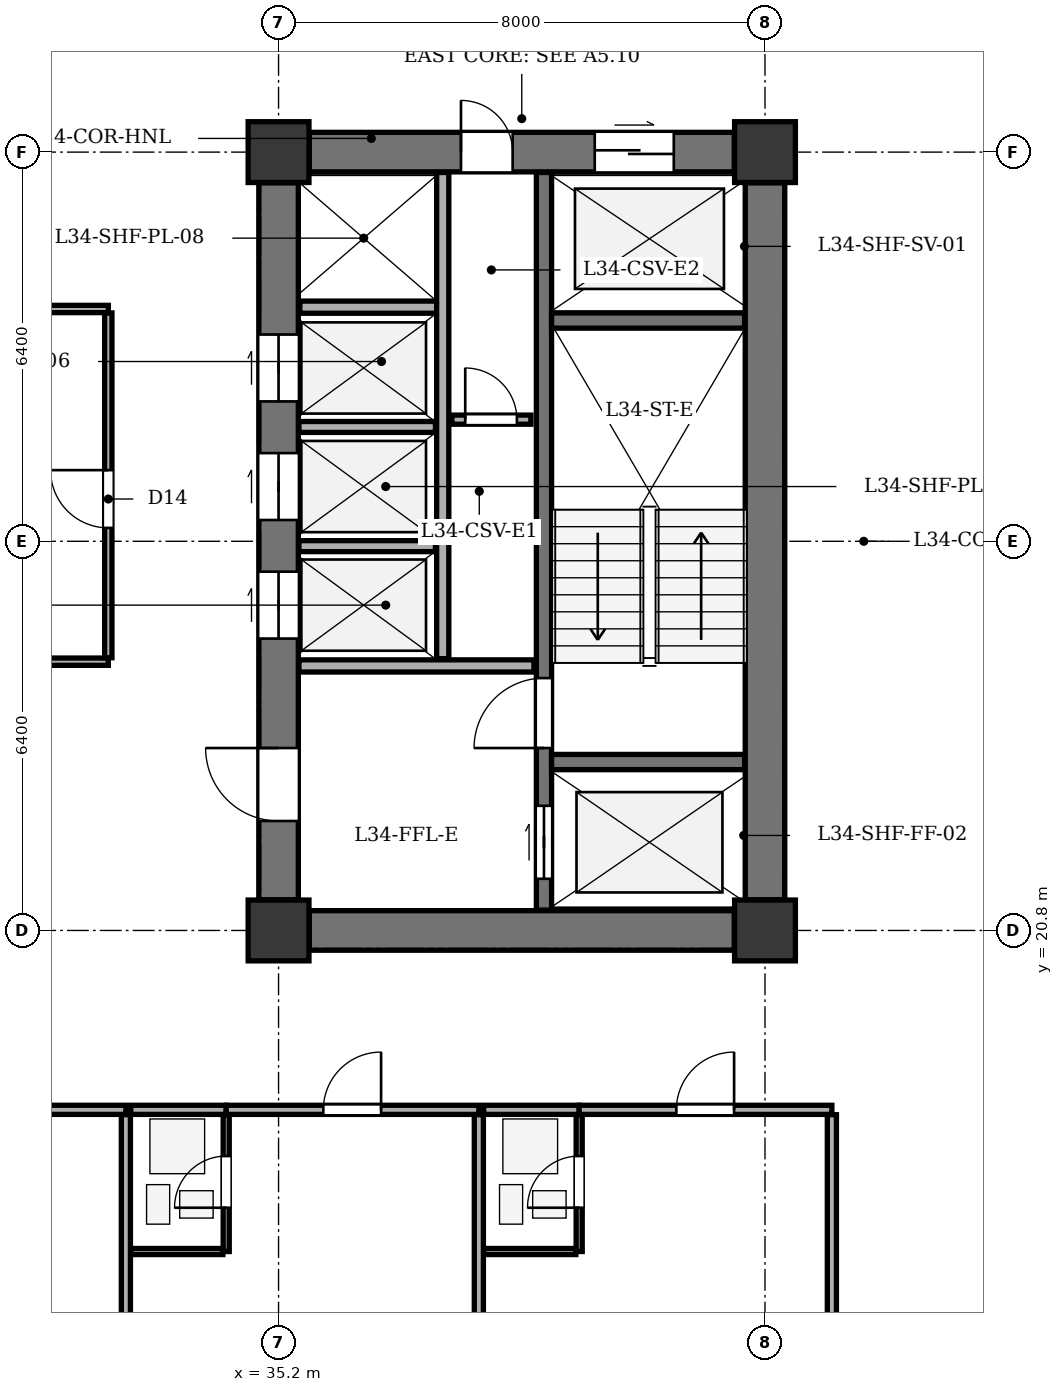
"""IFC4 building model, lengths in metres.
Left out: names, types, materials, properties, quantities, classifications, styles, units other than length and angle.
Written with IfcOpenShell. Run it as: python <this file> out.ifc"""

import sys

from ifc_helpers import new_model, si_unit, direction, frame, frame_2d, origin, origin_2d, place, context, subcontext, project, spatial, rectangle, extrude, element, fill, save


model = new_model("IFC4")
c1 = context("Model", 3, precision=1e-05, world=origin(), true_north=direction((0.0, 1.0)))
c2 = subcontext(c1, "Body", "Model", "MODEL_VIEW")
j1 = project(units=[si_unit("LENGTHUNIT", "METRE"), si_unit("PLANEANGLEUNIT", "RADIAN")], contexts=[c1])
p1 = place(None, origin())
s1 = spatial("IfcSite", under=j1, at=p1, CompositionType="ELEMENT")
p2 = place(p1, origin())
s2 = spatial("IfcBuilding", under=s1, at=p2, CompositionType="ELEMENT")
p3 = place(p2, frame((0.0, 0.0, 137.8)))
s3 = spatial("IfcBuildingStorey", under=s2, at=p3, CompositionType="ELEMENT", Elevation=137.8)
for number, where, z_axis, x_axis in (
    (1, (35.2, 20.8, 0.0), (0.0, 0.0, 1.0), (1.0, 0.0, 0.0)),
    (2, (43.2, 20.8, 0.0), (0.0, 0.0, 1.0), (1.0, 0.0, 0.0)),
    (3, (35.2, 33.6, 0.0), (0.0, 0.0, 1.0), (1.0, 0.0, 0.0)),
    (4, (43.2, 33.6, 0.0), (0.0, 0.0, 1.0), (1.0, 0.0, 0.0)),
):
    element("IfcColumn", number, at=place(p3, frame(where, z_axis=z_axis, x_axis=x_axis)), inside=s3, PredefinedType="COLUMN", context=c2, shape_type="SweptSolid", body=[
        extrude(rectangle(XDim=1.0, YDim=1.0, at=origin_2d()), origin(), (0.0, 0.0, 1.0), 3.5),
    ])
p4 = place(p3, frame((43.2, 21.305, 0.0), z_axis=(0.0, 0.0, 1.0), x_axis=(0.0, 1.0, 0.0)))
e5 = element("IfcWall", 5, at=p4, inside=s3, PredefinedType="SHEAR", context=c2, shape_type="SweptSolid", body=[
    extrude(rectangle(XDim=11.79, YDim=0.65, at=frame_2d((5.895, 0.0))), origin(), (0.0, 0.0, 1.0), 3.05),
])
p5 = place(p3, frame((35.705, 20.8, 0.0), z_axis=(0.0, 0.0, 1.0), x_axis=(1.0, 0.0, 0.0)))
e6 = element("IfcWall", 6, at=p5, inside=s3, PredefinedType="SHEAR", context=c2, shape_type="SweptSolid", body=[
    extrude(rectangle(XDim=6.99, YDim=0.65, at=frame_2d((3.495, 0.0))), origin(), (0.0, 0.0, 1.0), 3.05),
])
p6 = place(p3, frame((35.705, 33.6, 0.0), z_axis=(0.0, 0.0, 1.0), x_axis=(1.0, 0.0, 0.0)))
e7 = element("IfcWall", 7, at=p6, inside=s3, PredefinedType="SHEAR", context=c2, shape_type="SweptSolid", body=[
    extrude(rectangle(XDim=6.99, YDim=0.65, at=frame_2d((3.495, 0.0))), origin(), (0.0, 0.0, 1.0), 3.05),
])
p7 = place(p6, frame((4.695, 0.0, 0.0)))
e8 = element("IfcOpeningElement", 8, at=p7, cuts=e7, PredefinedType="OPENING", context=c2, shape_type="SweptSolid", body=[
    extrude(rectangle(XDim=1.3, YDim=2.15, at=frame_2d((0.65, 1.075))), frame((0.0, 0.335, 0.0), z_axis=(0.0, -1.0, 0.0), x_axis=(1.0, 0.0, 0.0)), (0.0, 0.0, 1.0), 0.67),
])
p8 = place(p6, frame((2.495, 0.0, 0.0)))
e9 = element("IfcOpeningElement", 9, at=p8, cuts=e7, PredefinedType="OPENING", context=c2, shape_type="SweptSolid", body=[
    extrude(rectangle(XDim=0.85, YDim=2.02, at=frame_2d((0.425, 1.01))), frame((0.0, 0.335, 0.0), z_axis=(0.0, -1.0, 0.0), x_axis=(1.0, 0.0, 0.0)), (0.0, 0.0, 1.0), 0.67),
])
p9 = place(p3, frame((35.2, 21.305, 0.0), z_axis=(0.0, 0.0, 1.0), x_axis=(0.0, 1.0, 0.0)))
e10 = element("IfcWall", 10, at=p9, inside=s3, PredefinedType="SHEAR", context=c2, shape_type="SweptSolid", body=[
    extrude(rectangle(XDim=11.79, YDim=0.65, at=frame_2d((5.895, 0.0))), origin(), (0.0, 0.0, 1.0), 3.05),
])
p10 = place(p9, frame((1.295, 0.0, 0.0)))
e11 = element("IfcOpeningElement", 11, at=p10, cuts=e10, PredefinedType="OPENING", context=c2, shape_type="SweptSolid", body=[
    extrude(rectangle(XDim=1.2, YDim=2.15, at=frame_2d((0.6, 1.075))), frame((0.0, 0.335, 0.0), z_axis=(0.0, -1.0, 0.0), x_axis=(1.0, 0.0, 0.0)), (0.0, 0.0, 1.0), 0.67),
])
p11 = place(p9, frame((4.295, 0.0, 0.0)))
e12 = element("IfcOpeningElement", 12, at=p11, cuts=e10, PredefinedType="OPENING", context=c2, shape_type="SweptSolid", body=[
    extrude(rectangle(XDim=1.1, YDim=2.1, at=frame_2d((0.55, 1.05))), frame((0.0, 0.335, 0.0), z_axis=(0.0, -1.0, 0.0), x_axis=(1.0, 0.0, 0.0)), (0.0, 0.0, 1.0), 0.67),
])
p12 = place(p9, frame((6.245, 0.0, 0.0)))
e13 = element("IfcOpeningElement", 13, at=p12, cuts=e10, PredefinedType="OPENING", context=c2, shape_type="SweptSolid", body=[
    extrude(rectangle(XDim=1.1, YDim=2.1, at=frame_2d((0.55, 1.05))), frame((0.0, 0.335, 0.0), z_axis=(0.0, -1.0, 0.0), x_axis=(1.0, 0.0, 0.0)), (0.0, 0.0, 1.0), 0.67),
])
p13 = place(p9, frame((8.195, 0.0, 0.0)))
e14 = element("IfcOpeningElement", 14, at=p13, cuts=e10, PredefinedType="OPENING", context=c2, shape_type="SweptSolid", body=[
    extrude(rectangle(XDim=1.1, YDim=2.1, at=frame_2d((0.55, 1.05))), frame((0.0, 0.335, 0.0), z_axis=(0.0, -1.0, 0.0), x_axis=(1.0, 0.0, 0.0)), (0.0, 0.0, 1.0), 0.67),
])
p14 = place(p3, frame((39.565, 21.135, 0.0), z_axis=(0.0, 0.0, 1.0), x_axis=(0.0, 1.0, 0.0)))
e15 = element("IfcWall", 15, at=p14, inside=s3, PredefinedType="SHEAR", context=c2, shape_type="SweptSolid", body=[
    extrude(rectangle(XDim=12.13, YDim=0.25, at=frame_2d((6.065, 0.0))), origin(), (0.0, 0.0, 1.0), 3.05),
])
p15 = place(p14, frame((0.515, 0.0, 0.0)))
e16 = element("IfcOpeningElement", 16, at=p15, cuts=e15, PredefinedType="OPENING", context=c2, shape_type="SweptSolid", body=[
    extrude(rectangle(XDim=1.2, YDim=2.15, at=frame_2d((0.6, 1.075))), frame((0.0, 0.135, 0.0), z_axis=(0.0, -1.0, 0.0), x_axis=(1.0, 0.0, 0.0)), (0.0, 0.0, 1.0), 0.27),
])
p16 = place(p14, frame((2.665, 0.0, 0.0)))
e17 = element("IfcOpeningElement", 17, at=p16, cuts=e15, PredefinedType="OPENING", context=c2, shape_type="SweptSolid", body=[
    extrude(rectangle(XDim=1.15, YDim=2.15, at=frame_2d((0.575, 1.075))), frame((0.0, 0.135, 0.0), z_axis=(0.0, -1.0, 0.0), x_axis=(1.0, 0.0, 0.0)), (0.0, 0.0, 1.0), 0.27),
])
for number, where, z_axis, x_axis in (
    (18, (39.69, 23.57, 0.0), (0.0, 0.0, 1.0), (1.0, 0.0, 0.0)),
    (19, (39.69, 30.83, 0.0), (0.0, 0.0, 1.0), (1.0, 0.0, 0.0)),
):
    element("IfcWall", number, at=place(p3, frame(where, z_axis=z_axis, x_axis=x_axis)), inside=s3, PredefinedType="SHEAR", context=c2, shape_type="SweptSolid", body=[
        extrude(rectangle(XDim=3.175, YDim=0.25, at=frame_2d((1.587, 0.0))), origin(), (0.0, 0.0, 1.0), 3.05),
    ])
p17 = place(p3, frame((35.535, 25.15, 0.0), z_axis=(0.0, 0.0, 1.0), x_axis=(1.0, 0.0, 0.0)))
e20 = element("IfcWall", 20, at=p17, inside=s3, PredefinedType="SOLIDWALL", context=c2, shape_type="SweptSolid", body=[
    extrude(rectangle(XDim=3.865, YDim=0.2, at=frame_2d((1.933, 0.0))), origin(), (0.0, 0.0, 1.0), 3.05),
])
p18 = place(p3, frame((35.55, 31.05, 0.0), z_axis=(0.0, 0.0, 1.0), x_axis=(1.0, 0.0, 0.0)))
e21 = element("IfcWall", 21, at=p18, inside=s3, PredefinedType="SOLIDWALL", context=c2, shape_type="SweptSolid", body=[
    extrude(rectangle(XDim=2.25, YDim=0.2, at=frame_2d((1.125, 0.0))), origin(), (0.0, 0.0, 1.0), 3.05),
])
p19 = place(p3, frame((37.9, 25.27, 0.0), z_axis=(0.0, 0.0, 1.0), x_axis=(0.0, 1.0, 0.0)))
e22 = element("IfcWall", 22, at=p19, inside=s3, PredefinedType="SOLIDWALL", context=c2, shape_type="SweptSolid", body=[
    extrude(rectangle(XDim=7.995, YDim=0.2, at=frame_2d((3.998, 0.0))), origin(), (0.0, 0.0, 1.0), 3.05),
])
for number, where, z_axis, x_axis in (
    (23, (35.535, 27.12, 0.0), (0.0, 0.0, 1.0), (1.0, 0.0, 0.0)),
    (24, (35.535, 29.08, 0.0), (0.0, 0.0, 1.0), (1.0, 0.0, 0.0)),
):
    element("IfcWall", number, at=place(p3, frame(where, z_axis=z_axis, x_axis=x_axis)), inside=s3, PredefinedType="PARTITIONING", context=c2, shape_type="SweptSolid", body=[
        extrude(rectangle(XDim=2.245, YDim=0.18, at=frame_2d((1.123, 0.0))), origin(), (0.0, 0.0, 1.0), 3.05),
    ])
p20 = place(p3, frame((38.05, 29.2, 0.0), z_axis=(0.0, 0.0, 1.0), x_axis=(1.0, 0.0, 0.0)))
e25 = element("IfcWall", 25, at=p20, inside=s3, PredefinedType="PARTITIONING", context=c2, shape_type="SweptSolid", body=[
    extrude(rectangle(XDim=1.3, YDim=0.15, at=frame_2d((0.65, 0.0))), origin(), (0.0, 0.0, 1.0), 3.05),
])
p21 = place(p20, frame((0.22, 0.0, 0.0)))
e26 = element("IfcOpeningElement", 26, at=p21, cuts=e25, PredefinedType="OPENING", context=c2, shape_type="SweptSolid", body=[
    extrude(rectangle(XDim=0.85, YDim=2.02, at=frame_2d((0.425, 1.01))), frame((0.0, 0.085, 0.0), z_axis=(0.0, -1.0, 0.0), x_axis=(1.0, 0.0, 0.0)), (0.0, 0.0, 1.0), 0.17),
])
p22 = place(p3, frame((20.46, 25.22, 0.0), z_axis=(0.0, 0.0, 1.0), x_axis=(1.0, 0.0, 0.0)))
e27 = element("IfcWall", 27, at=p22, inside=s3, PredefinedType="PARTITIONING", context=c2, shape_type="SweptSolid", body=[
    extrude(rectangle(XDim=11.94, YDim=0.12, at=frame_2d((5.97, 0.0))), origin(), (0.0, 0.0, 1.0), 3.05),
])
p23 = place(p22, frame((2.39, 0.0, 0.0)))
e28 = element("IfcOpeningElement", 28, at=p23, cuts=e27, PredefinedType="OPENING", context=c2, shape_type="SweptSolid", body=[
    extrude(rectangle(XDim=1.0, YDim=2.1, at=frame_2d((0.5, 1.05))), frame((0.0, 0.07, 0.0), z_axis=(0.0, -1.0, 0.0), x_axis=(1.0, 0.0, 0.0)), (0.0, 0.0, 1.0), 0.14),
])
p24 = place(p3, frame((20.46, 31.02, 0.0), z_axis=(0.0, 0.0, 1.0), x_axis=(1.0, 0.0, 0.0)))
e29 = element("IfcWall", 29, at=p24, inside=s3, PredefinedType="PARTITIONING", context=c2, shape_type="SweptSolid", body=[
    extrude(rectangle(XDim=11.94, YDim=0.12, at=frame_2d((5.97, 0.0))), origin(), (0.0, 0.0, 1.0), 3.05),
])
p25 = place(p3, frame((32.4, 25.285, 0.0), z_axis=(0.0, 0.0, 1.0), x_axis=(0.0, 1.0, 0.0)))
e30 = element("IfcWall", 30, at=p25, inside=s3, PredefinedType="PARTITIONING", context=c2, shape_type="SweptSolid", body=[
    extrude(rectangle(XDim=5.67, YDim=0.12, at=frame_2d((2.835, 0.0))), origin(), (0.0, 0.0, 1.0), 3.05),
])
p26 = place(p25, frame((2.135, 0.0, 0.0)))
e31 = element("IfcOpeningElement", 31, at=p26, cuts=e30, PredefinedType="OPENING", context=c2, shape_type="SweptSolid", body=[
    extrude(rectangle(XDim=0.95, YDim=2.1, at=frame_2d((0.475, 1.05))), frame((0.0, 0.07, 0.0), z_axis=(0.0, -1.0, 0.0), x_axis=(1.0, 0.0, 0.0)), (0.0, 0.0, 1.0), 0.14),
])
p27 = place(p3, frame((28.533, 17.85, 0.0), z_axis=(0.0, 0.0, 1.0), x_axis=(1.0, 0.0, 0.0)))
e32 = element("IfcWall", 32, at=p27, inside=s3, PredefinedType="PARTITIONING", context=c2, shape_type="SweptSolid", body=[
    extrude(rectangle(XDim=4.156, YDim=0.15, at=frame_2d((2.078, 0.0))), origin(), (0.0, 0.0, 1.0), 3.05),
])
p28 = place(p27, frame((1.598, 0.0, 0.0)))
e33 = element("IfcOpeningElement", 33, at=p28, cuts=e32, PredefinedType="OPENING", context=c2, shape_type="SweptSolid", body=[
    extrude(rectangle(XDim=0.95, YDim=2.1, at=frame_2d((0.475, 1.05))), frame((0.0, 0.085, 0.0), z_axis=(0.0, -1.0, 0.0), x_axis=(1.0, 0.0, 0.0)), (0.0, 0.0, 1.0), 0.17),
])
p29 = place(p3, frame((32.689, 1.875, 0.0), z_axis=(0.0, 0.0, 1.0), x_axis=(0.0, 1.0, 0.0)))
e34 = element("IfcWall", 34, at=p29, inside=s3, PredefinedType="PARTITIONING", context=c2, shape_type="SweptSolid", body=[
    extrude(rectangle(XDim=15.895, YDim=0.15, at=frame_2d((7.948, 0.0))), origin(), (0.0, 0.0, 1.0), 3.05),
])
p30 = place(p3, frame((32.769, 17.85, 0.0), z_axis=(0.0, 0.0, 1.0), x_axis=(1.0, 0.0, 0.0)))
e35 = element("IfcWall", 35, at=p30, inside=s3, PredefinedType="PARTITIONING", context=c2, shape_type="SweptSolid", body=[
    extrude(rectangle(XDim=1.57, YDim=0.15, at=frame_2d((0.785, 0.0))), origin(), (0.0, 0.0, 1.0), 3.05),
])
p31 = place(p3, frame((34.339, 17.85, 0.0), z_axis=(0.0, 0.0, 1.0), x_axis=(1.0, 0.0, 0.0)))
e36 = element("IfcWall", 36, at=p31, inside=s3, PredefinedType="PARTITIONING", context=c2, shape_type="SweptSolid", body=[
    extrude(rectangle(XDim=4.155, YDim=0.15, at=frame_2d((2.077, 0.0))), origin(), (0.0, 0.0, 1.0), 3.05),
])
p32 = place(p31, frame((1.597, 0.0, 0.0)))
e37 = element("IfcOpeningElement", 37, at=p32, cuts=e36, PredefinedType="OPENING", context=c2, shape_type="SweptSolid", body=[
    extrude(rectangle(XDim=0.95, YDim=2.1, at=frame_2d((0.475, 1.05))), frame((0.0, 0.085, 0.0), z_axis=(0.0, -1.0, 0.0), x_axis=(1.0, 0.0, 0.0)), (0.0, 0.0, 1.0), 0.17),
])
p33 = place(p3, frame((34.339, 15.52, 0.0), z_axis=(0.0, 0.0, 1.0), x_axis=(0.0, 1.0, 0.0)))
e38 = element("IfcWall", 38, at=p33, inside=s3, PredefinedType="PARTITIONING", context=c2, shape_type="SweptSolid", body=[
    extrude(rectangle(XDim=2.25, YDim=0.1, at=frame_2d((1.125, 0.0))), origin(), (0.0, 0.0, 1.0), 3.05),
])
p34 = place(p33, frame((0.72, 0.0, 0.0)))
e39 = element("IfcOpeningElement", 39, at=p34, cuts=e38, PredefinedType="OPENING", context=c2, shape_type="SweptSolid", body=[
    extrude(rectangle(XDim=0.85, YDim=2.05, at=frame_2d((0.425, 1.025))), frame((0.0, 0.06, 0.0), z_axis=(0.0, -1.0, 0.0), x_axis=(1.0, 0.0, 0.0)), (0.0, 0.0, 1.0), 0.12),
])
p35 = place(p3, frame((32.769, 15.52, 0.0), z_axis=(0.0, 0.0, 1.0), x_axis=(1.0, 0.0, 0.0)))
e40 = element("IfcWall", 40, at=p35, inside=s3, PredefinedType="PARTITIONING", context=c2, shape_type="SweptSolid", body=[
    extrude(rectangle(XDim=1.515, YDim=0.1, at=frame_2d((0.757, 0.0))), origin(), (0.0, 0.0, 1.0), 3.05),
])
p36 = place(p3, frame((38.494, 1.875, 0.0), z_axis=(0.0, 0.0, 1.0), x_axis=(0.0, 1.0, 0.0)))
e41 = element("IfcWall", 41, at=p36, inside=s3, PredefinedType="PARTITIONING", context=c2, shape_type="SweptSolid", body=[
    extrude(rectangle(XDim=15.895, YDim=0.15, at=frame_2d((7.948, 0.0))), origin(), (0.0, 0.0, 1.0), 2.485),
])
p37 = place(p3, frame((38.574, 17.85, 0.0), z_axis=(0.0, 0.0, 1.0), x_axis=(1.0, 0.0, 0.0)))
e42 = element("IfcWall", 42, at=p37, inside=s3, PredefinedType="PARTITIONING", context=c2, shape_type="SweptSolid", body=[
    extrude(rectangle(XDim=1.57, YDim=0.15, at=frame_2d((0.785, 0.0))), origin(), (0.0, 0.0, 1.0), 3.05),
])
p38 = place(p3, frame((40.144, 17.85, 0.0), z_axis=(0.0, 0.0, 1.0), x_axis=(1.0, 0.0, 0.0)))
e43 = element("IfcWall", 43, at=p38, inside=s3, PredefinedType="PARTITIONING", context=c2, shape_type="SweptSolid", body=[
    extrude(rectangle(XDim=4.156, YDim=0.15, at=frame_2d((2.078, 0.0))), origin(), (0.0, 0.0, 1.0), 3.05),
])
p39 = place(p38, frame((1.598, 0.0, 0.0)))
e44 = element("IfcOpeningElement", 44, at=p39, cuts=e43, PredefinedType="OPENING", context=c2, shape_type="SweptSolid", body=[
    extrude(rectangle(XDim=0.95, YDim=2.1, at=frame_2d((0.475, 1.05))), frame((0.0, 0.085, 0.0), z_axis=(0.0, -1.0, 0.0), x_axis=(1.0, 0.0, 0.0)), (0.0, 0.0, 1.0), 0.17),
])
p40 = place(p3, frame((40.144, 15.52, 0.0), z_axis=(0.0, 0.0, 1.0), x_axis=(0.0, 1.0, 0.0)))
e45 = element("IfcWall", 45, at=p40, inside=s3, PredefinedType="PARTITIONING", context=c2, shape_type="SweptSolid", body=[
    extrude(rectangle(XDim=2.25, YDim=0.1, at=frame_2d((1.125, 0.0))), origin(), (0.0, 0.0, 1.0), 3.05),
])
p41 = place(p40, frame((0.72, 0.0, 0.0)))
e46 = element("IfcOpeningElement", 46, at=p41, cuts=e45, PredefinedType="OPENING", context=c2, shape_type="SweptSolid", body=[
    extrude(rectangle(XDim=0.85, YDim=2.05, at=frame_2d((0.425, 1.025))), frame((0.0, 0.06, 0.0), z_axis=(0.0, -1.0, 0.0), x_axis=(1.0, 0.0, 0.0)), (0.0, 0.0, 1.0), 0.12),
])
p42 = place(p3, frame((38.574, 15.52, 0.0), z_axis=(0.0, 0.0, 1.0), x_axis=(1.0, 0.0, 0.0)))
e47 = element("IfcWall", 47, at=p42, inside=s3, PredefinedType="PARTITIONING", context=c2, shape_type="SweptSolid", body=[
    extrude(rectangle(XDim=1.515, YDim=0.1, at=frame_2d((0.758, 0.0))), origin(), (0.0, 0.0, 1.0), 3.05),
])
p43 = place(p3, frame((44.3, 1.875, 0.0), z_axis=(0.0, 0.0, 1.0), x_axis=(0.0, 1.0, 0.0)))
e48 = element("IfcWall", 48, at=p43, inside=s3, PredefinedType="PARTITIONING", context=c2, shape_type="SweptSolid", body=[
    extrude(rectangle(XDim=15.895, YDim=0.15, at=frame_2d((7.948, 0.0))), origin(), (0.0, 0.0, 1.0), 3.05),
])
p44 = place(p7, origin())
e49 = element("IfcDoor", 49, at=p44, inside=s3, OperationType="DOUBLE_DOOR_SLIDING", PredefinedType="DOOR", context=c2, shape_type="SweptSolid", body=[
    extrude(rectangle(XDim=1.3, YDim=2.15, at=frame_2d((0.65, 1.075))), frame((0.0, 0.025, 0.0), z_axis=(0.0, -1.0, 0.0), x_axis=(1.0, 0.0, 0.0)), (0.0, 0.0, 1.0), 0.05),
])
fill(e8, e49)
p45 = place(p8, origin())
e50 = element("IfcDoor", 50, at=p45, inside=s3, OperationType="SINGLE_SWING_LEFT", PredefinedType="DOOR", context=c2, shape_type="SweptSolid", body=[
    extrude(rectangle(XDim=0.85, YDim=2.02, at=frame_2d((0.425, 1.01))), frame((0.0, 0.025, 0.0), z_axis=(0.0, -1.0, 0.0), x_axis=(1.0, 0.0, 0.0)), (0.0, 0.0, 1.0), 0.05),
])
fill(e9, e50)
p46 = place(p10, origin())
e51 = element("IfcDoor", 51, at=p46, inside=s3, OperationType="SINGLE_SWING_RIGHT", PredefinedType="DOOR", context=c2, shape_type="SweptSolid", body=[
    extrude(rectangle(XDim=1.2, YDim=2.15, at=frame_2d((0.6, 1.075))), frame((0.0, 0.025, 0.0), z_axis=(0.0, -1.0, 0.0), x_axis=(1.0, 0.0, 0.0)), (0.0, 0.0, 1.0), 0.05),
])
fill(e11, e51)
p47 = place(p11, origin())
e52 = element("IfcDoor", 52, at=p47, inside=s3, OperationType="DOUBLE_DOOR_SLIDING", PredefinedType="DOOR", context=c2, shape_type="SweptSolid", body=[
    extrude(rectangle(XDim=1.1, YDim=2.1, at=frame_2d((0.55, 1.05))), frame((0.0, 0.025, 0.0), z_axis=(0.0, -1.0, 0.0), x_axis=(1.0, 0.0, 0.0)), (0.0, 0.0, 1.0), 0.05),
])
fill(e12, e52)
p48 = place(p12, origin())
e53 = element("IfcDoor", 53, at=p48, inside=s3, OperationType="DOUBLE_DOOR_SLIDING", PredefinedType="DOOR", context=c2, shape_type="SweptSolid", body=[
    extrude(rectangle(XDim=1.1, YDim=2.1, at=frame_2d((0.55, 1.05))), frame((0.0, 0.025, 0.0), z_axis=(0.0, -1.0, 0.0), x_axis=(1.0, 0.0, 0.0)), (0.0, 0.0, 1.0), 0.05),
])
fill(e13, e53)
p49 = place(p13, origin())
e54 = element("IfcDoor", 54, at=p49, inside=s3, OperationType="DOUBLE_DOOR_SLIDING", PredefinedType="DOOR", context=c2, shape_type="SweptSolid", body=[
    extrude(rectangle(XDim=1.1, YDim=2.1, at=frame_2d((0.55, 1.05))), frame((0.0, 0.025, 0.0), z_axis=(0.0, -1.0, 0.0), x_axis=(1.0, 0.0, 0.0)), (0.0, 0.0, 1.0), 0.05),
])
fill(e14, e54)
p50 = place(p15, origin())
e55 = element("IfcDoor", 55, at=p50, inside=s3, OperationType="DOUBLE_DOOR_SLIDING", PredefinedType="DOOR", context=c2, shape_type="SweptSolid", body=[
    extrude(rectangle(XDim=1.2, YDim=2.15, at=frame_2d((0.6, 1.075))), frame((0.0, 0.025, 0.0), z_axis=(0.0, -1.0, 0.0), x_axis=(1.0, 0.0, 0.0)), (0.0, 0.0, 1.0), 0.05),
])
fill(e16, e55)
p51 = place(p16, origin())
e56 = element("IfcDoor", 56, at=p51, inside=s3, OperationType="SINGLE_SWING_LEFT", PredefinedType="DOOR", context=c2, shape_type="SweptSolid", body=[
    extrude(rectangle(XDim=1.15, YDim=2.15, at=frame_2d((0.575, 1.075))), frame((0.0, 0.025, 0.0), z_axis=(0.0, -1.0, 0.0), x_axis=(1.0, 0.0, 0.0)), (0.0, 0.0, 1.0), 0.05),
])
fill(e17, e56)
p52 = place(p21, origin())
e57 = element("IfcDoor", 57, at=p52, inside=s3, OperationType="SINGLE_SWING_LEFT", PredefinedType="DOOR", context=c2, shape_type="SweptSolid", body=[
    extrude(rectangle(XDim=0.85, YDim=2.02, at=frame_2d((0.425, 1.01))), frame((0.0, 0.025, 0.0), z_axis=(0.0, -1.0, 0.0), x_axis=(1.0, 0.0, 0.0)), (0.0, 0.0, 1.0), 0.05),
])
fill(e26, e57)
p53 = place(p26, origin())
e58 = element("IfcDoor", 58, at=p53, inside=s3, OperationType="SINGLE_SWING_RIGHT", PredefinedType="DOOR", context=c2, shape_type="SweptSolid", body=[
    extrude(rectangle(XDim=0.95, YDim=2.1, at=frame_2d((0.475, 1.05))), frame((0.0, 0.025, 0.0), z_axis=(0.0, -1.0, 0.0), x_axis=(1.0, 0.0, 0.0)), (0.0, 0.0, 1.0), 0.05),
])
fill(e31, e58)
p54 = place(p34, origin())
e59 = element("IfcDoor", 59, at=p54, inside=s3, OperationType="SINGLE_SWING_LEFT", PredefinedType="DOOR", context=c2, shape_type="SweptSolid", body=[
    extrude(rectangle(XDim=0.85, YDim=2.05, at=frame_2d((0.425, 1.025))), frame((0.0, 0.025, 0.0), z_axis=(0.0, -1.0, 0.0), x_axis=(1.0, 0.0, 0.0)), (0.0, 0.0, 1.0), 0.05),
])
fill(e39, e59)
p55 = place(p32, origin())
e60 = element("IfcDoor", 60, at=p55, inside=s3, OperationType="SINGLE_SWING_RIGHT", PredefinedType="DOOR", context=c2, shape_type="SweptSolid", body=[
    extrude(rectangle(XDim=0.95, YDim=2.1, at=frame_2d((0.475, 1.05))), frame((0.0, 0.025, 0.0), z_axis=(0.0, -1.0, 0.0), x_axis=(1.0, 0.0, 0.0)), (0.0, 0.0, 1.0), 0.05),
])
fill(e37, e60)
p56 = place(p41, origin())
e61 = element("IfcDoor", 61, at=p56, inside=s3, OperationType="SINGLE_SWING_LEFT", PredefinedType="DOOR", context=c2, shape_type="SweptSolid", body=[
    extrude(rectangle(XDim=0.85, YDim=2.05, at=frame_2d((0.425, 1.025))), frame((0.0, 0.025, 0.0), z_axis=(0.0, -1.0, 0.0), x_axis=(1.0, 0.0, 0.0)), (0.0, 0.0, 1.0), 0.05),
])
fill(e46, e61)
p57 = place(p39, origin())
e62 = element("IfcDoor", 62, at=p57, inside=s3, OperationType="SINGLE_SWING_RIGHT", PredefinedType="DOOR", context=c2, shape_type="SweptSolid", body=[
    extrude(rectangle(XDim=0.95, YDim=2.1, at=frame_2d((0.475, 1.05))), frame((0.0, 0.025, 0.0), z_axis=(0.0, -1.0, 0.0), x_axis=(1.0, 0.0, 0.0)), (0.0, 0.0, 1.0), 0.05),
])
fill(e44, e62)
save(model, sys.argv[1])
